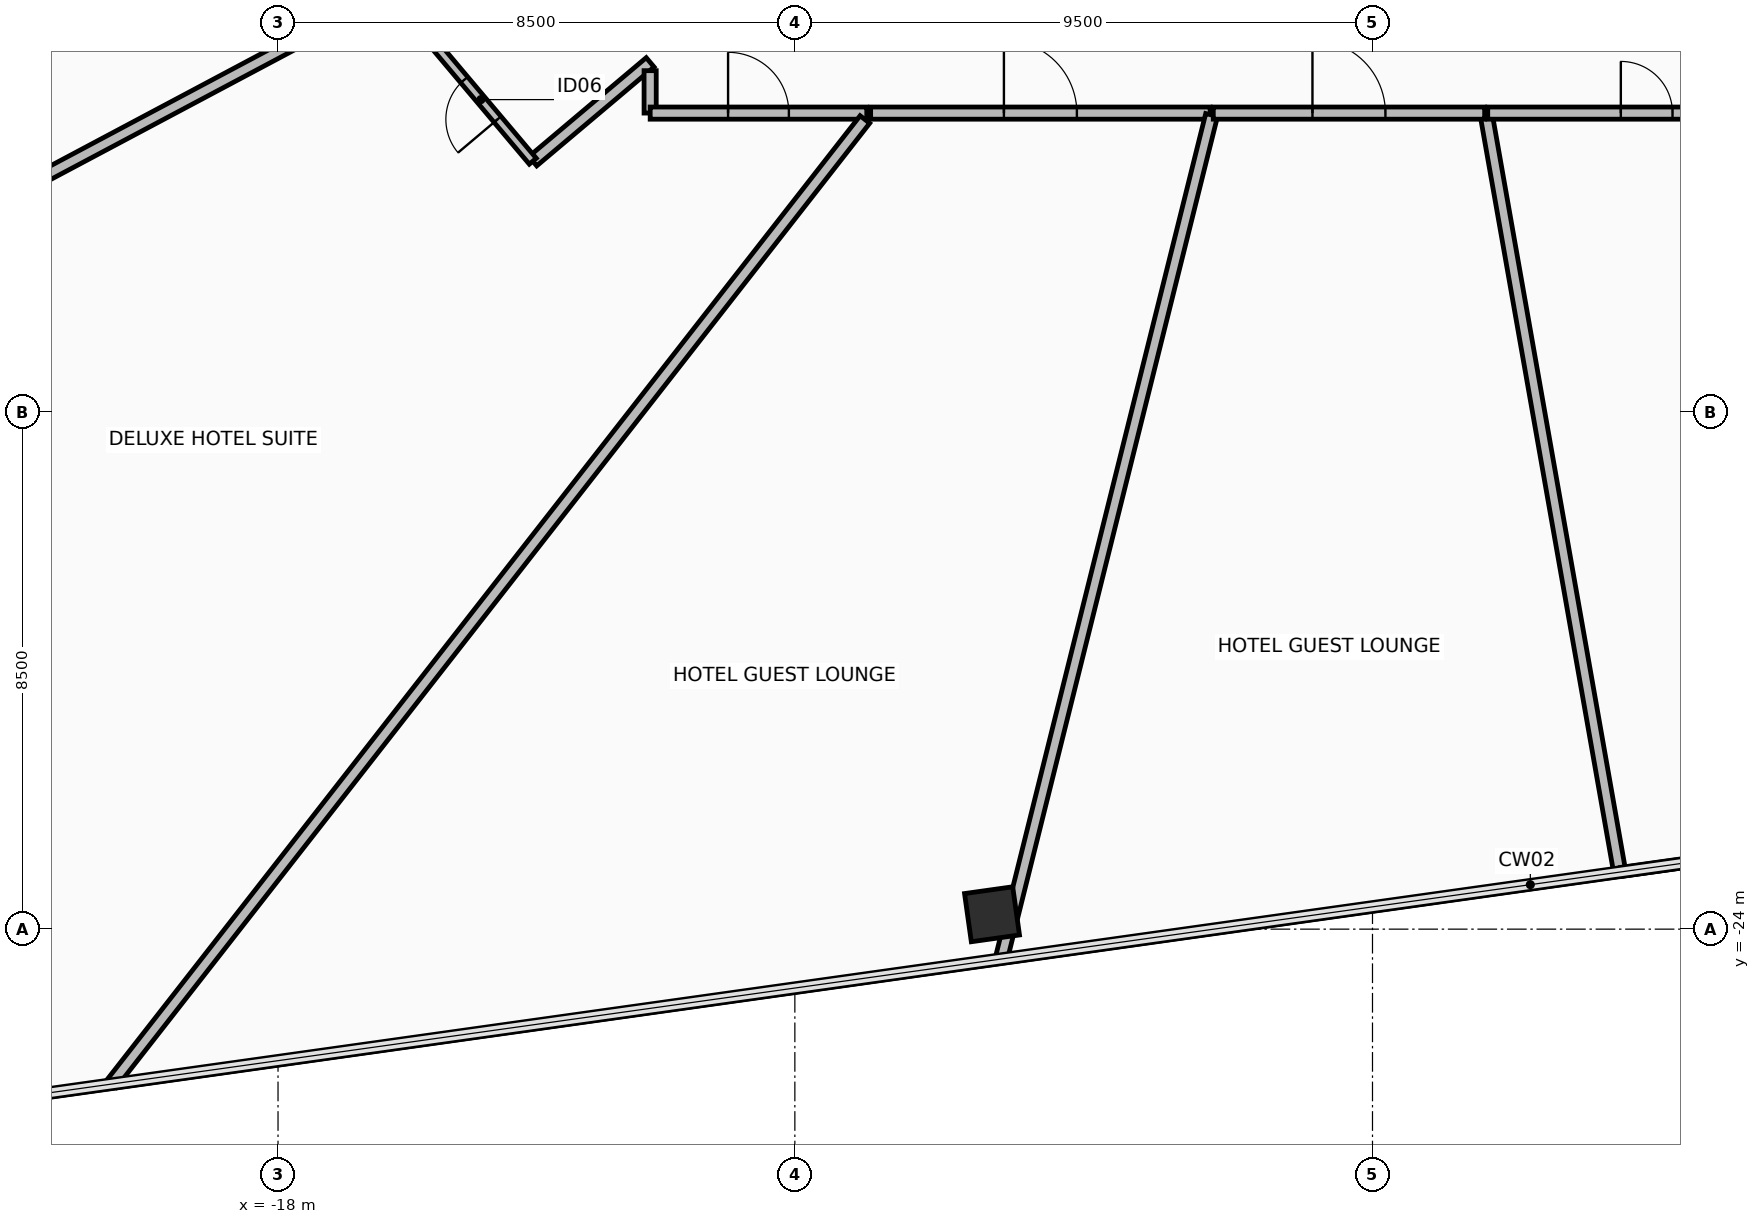
"""IFC4 building model, lengths in metres.
Left out: names, types, materials, properties, quantities, classifications, styles, units other than length and angle.
Written with IfcOpenShell. Run it as: python <this file> out.ifc"""

import sys

from ifc_helpers import new_model, si_unit, direction, frame, frame_2d, origin, origin_2d, place, context, subcontext, project, spatial, rectangle, hollow_rectangle, extrude, element, fill, save


model = new_model("IFC4")
c1 = context("Model", 3, precision=1e-05, world=origin(), true_north=direction((0.0, 1.0)))
c2 = subcontext(c1, "Body", "Model", "MODEL_VIEW")
j1 = project(units=[si_unit("LENGTHUNIT", "METRE"), si_unit("PLANEANGLEUNIT", "RADIAN")], contexts=[c1])
p1 = place(None, origin())
s1 = spatial("IfcSite", under=j1, at=p1, CompositionType="ELEMENT")
p2 = place(p1, origin())
s2 = spatial("IfcBuilding", under=s1, at=p2, CompositionType="ELEMENT")
p3 = place(p2, frame((0.0, 0.0, 57.0)))
s3 = spatial("IfcBuildingStorey", under=s2, at=p3, CompositionType="ELEMENT", Elevation=57.0)
p4 = place(p3, frame((-6.257, -23.755, -0.19), z_axis=(0.0, 0.0, 1.0), x_axis=(0.990268068742, 0.13917310096, 0.0)))
e1 = element("IfcColumn", 1, at=p4, inside=s3, PredefinedType="COLUMN", context=c2, shape_type="SweptSolid", body=[
    extrude(hollow_rectangle(XDim=0.8, YDim=0.8, WallThickness=0.045, at=origin_2d()), origin(), (0.0, 0.0, 1.0), 3.64),
])
p5 = place(p3, frame((-11.88, -9.745, 0.0), z_axis=(0.0, 0.0, 1.0), x_axis=(-0.764712982519, -0.644371053328, 0.0)))
e2 = element("IfcWall", 2, at=p5, inside=s3, PredefinedType="PARTITIONING", context=c2, shape_type="SweptSolid", body=[
    extrude(rectangle(XDim=2.524, YDim=0.2, at=frame_2d((1.262, 0.0))), origin(), (0.0, 0.0, 1.0), 3.275),
])
p6 = place(p3, frame((-13.81, -11.371, 0.0), z_axis=(0.0, 0.0, 1.0), x_axis=(-0.644478981733, 0.764622025647, 0.0)))
e3 = element("IfcWall", 3, at=p6, inside=s3, PredefinedType="PARTITIONING", context=c2, shape_type="SweptSolid", body=[
    extrude(rectangle(XDim=2.65, YDim=0.15, at=frame_2d((1.325, 0.0))), origin(), (0.0, 0.0, 1.0), 2.87),
])
p7 = place(p6, frame((0.9, 0.0, 0.0)))
e4 = element("IfcOpeningElement", 4, at=p7, cuts=e3, PredefinedType="OPENING", context=c2, shape_type="SweptSolid", body=[
    extrude(rectangle(XDim=0.85, YDim=2.1, at=frame_2d((0.425, 1.05))), frame((0.0, 0.085, 0.0), z_axis=(0.0, -1.0, 0.0), x_axis=(1.0, 0.0, 0.0)), (0.0, 0.0, 1.0), 0.17),
])
p8 = place(p3, frame((-11.893, -6.324, 0.0), z_axis=(0.0, 0.0, 1.0), x_axis=(-0.882946043117, -0.469474477416, 0.0)))
e5 = element("IfcWall", 5, at=p8, inside=s3, PredefinedType="PARTITIONING", context=c2, shape_type="SweptSolid", body=[
    extrude(rectangle(XDim=12.747, YDim=0.2, at=frame_2d((6.374, 0.0))), origin(), (0.0, 0.0, 1.0), 2.47),
])
p9 = place(p3, frame((-23.087, -12.156, 0.0), z_axis=(0.0, 0.0, 1.0), x_axis=(0.374605375648, 0.927184346576, 0.0)))
e6 = element("IfcWall", 6, at=p9, inside=s3, PredefinedType="PARTITIONING", context=c2, shape_type="SweptSolid", body=[
    extrude(rectangle(XDim=11.685, YDim=0.15, at=frame_2d((5.842, 0.0))), origin(), (0.0, 0.0, 1.0), 3.275),
])
p10 = place(p3, frame((4.062, -23.038, 0.0), z_axis=(0.0, 0.0, 1.0), x_axis=(-0.173658422676, 0.984805946486, 0.0)))
e7 = element("IfcWall", 7, at=p10, inside=s3, PredefinedType="PARTITIONING", context=c2, shape_type="SweptSolid", body=[
    extrude(rectangle(XDim=12.62, YDim=0.2, at=frame_2d((6.31, 0.0))), origin(), (0.0, 0.0, 1.0), 2.47),
])
p11 = place(p3, frame((1.895, -10.58, 0.0), z_axis=(0.0, 0.0, 1.0), x_axis=(1.0, 0.0, 0.0)))
e8 = element("IfcWall", 8, at=p11, inside=s3, PredefinedType="PARTITIONING", context=c2, shape_type="SweptSolid", body=[
    extrude(rectangle(XDim=5.228, YDim=0.2, at=frame_2d((2.614, 0.0))), origin(), (0.0, 0.0, 1.0), 3.275),
])
p12 = place(p11, frame((2.189, 0.0, 0.0)))
e9 = element("IfcOpeningElement", 9, at=p12, cuts=e8, PredefinedType="OPENING", context=c2, shape_type="SweptSolid", body=[
    extrude(rectangle(XDim=0.85, YDim=2.1, at=frame_2d((0.425, 1.05))), frame((0.0, 0.11, 0.0), z_axis=(0.0, -1.0, 0.0), x_axis=(1.0, 0.0, 0.0)), (0.0, 0.0, 1.0), 0.22),
])
p13 = place(p3, frame((14.445, -21.603, 0.0), z_axis=(0.0, 0.0, 1.0), x_axis=(-0.990270056923, -0.139158953581, 0.0)))
e10 = element("IfcWall", 10, at=p13, inside=s3, PredefinedType="PARTITIONING", context=c2, shape_type="SweptSolid", body=[
    extrude(rectangle(XDim=10.456, YDim=0.15, at=frame_2d((5.228, 0.0))), origin(), (0.0, 0.0, 1.0), 3.275),
])
p14 = place(p3, frame((-11.88, -9.882, 0.0), z_axis=(0.0, 0.0, 1.0), x_axis=(0.0, -1.0, 0.0)))
e11 = element("IfcWall", 11, at=p14, inside=s3, PredefinedType="PARTITIONING", context=c2, shape_type="SweptSolid", body=[
    extrude(rectangle(XDim=0.697, YDim=0.2, at=frame_2d((0.349, 0.0))), origin(), (0.0, 0.0, 1.0), 2.67),
])
p15 = place(p3, frame((-11.879, -10.58, 0.0), z_axis=(0.0, 0.0, 1.0), x_axis=(1.0, 0.0, 0.0)))
e12 = element("IfcWall", 12, at=p15, inside=s3, PredefinedType="PARTITIONING", context=c2, shape_type="SweptSolid", body=[
    extrude(rectangle(XDim=3.562, YDim=0.2, at=frame_2d((1.781, 0.0))), origin(), (0.0, 0.0, 1.0), 2.67),
])
p16 = place(p15, frame((1.281, 0.0, 0.0)))
e13 = element("IfcOpeningElement", 13, at=p16, cuts=e12, PredefinedType="OPENING", context=c2, shape_type="SweptSolid", body=[
    extrude(rectangle(XDim=1.0, YDim=2.15, at=frame_2d((0.5, 1.075))), frame((0.0, 0.11, 0.0), z_axis=(0.0, -1.0, 0.0), x_axis=(1.0, 0.0, 0.0)), (0.0, 0.0, 1.0), 0.22),
])
p17 = place(p3, frame((-8.348, -10.685, 0.0), z_axis=(0.0, 0.0, 1.0), x_axis=(-0.615661230884, -0.788010944585, 0.0)))
e14 = element("IfcWall", 14, at=p17, inside=s3, PredefinedType="PARTITIONING", context=c2, shape_type="SweptSolid", body=[
    extrude(rectangle(XDim=20.121, YDim=0.2, at=frame_2d((10.06, 0.0))), origin(), (0.0, 0.0, 1.0), 2.47),
])
p18 = place(p3, frame((-8.254, -10.58, 0.0), z_axis=(0.0, 0.0, 1.0), x_axis=(1.0, 0.0, 0.0)))
e15 = element("IfcWall", 15, at=p18, inside=s3, PredefinedType="PARTITIONING", context=c2, shape_type="SweptSolid", body=[
    extrude(rectangle(XDim=5.584, YDim=0.2, at=frame_2d((2.792, 0.0))), origin(), (0.0, 0.0, 1.0), 2.67),
])
p19 = place(p18, frame((2.192, 0.0, 0.0)))
e16 = element("IfcOpeningElement", 16, at=p19, cuts=e15, PredefinedType="OPENING", context=c2, shape_type="SweptSolid", body=[
    extrude(rectangle(XDim=1.2, YDim=2.15, at=frame_2d((0.6, 1.075))), frame((0.0, 0.11, 0.0), z_axis=(0.0, -1.0, 0.0), x_axis=(1.0, 0.0, 0.0)), (0.0, 0.0, 1.0), 0.22),
])
p20 = place(p3, frame((-2.646, -10.611, 0.0), z_axis=(0.0, 0.0, 1.0), x_axis=(-0.241928502378, -0.970294078997, 0.0)))
e17 = element("IfcWall", 17, at=p20, inside=s3, PredefinedType="PARTITIONING", context=c2, shape_type="SweptSolid", body=[
    extrude(rectangle(XDim=14.289, YDim=0.2, at=frame_2d((7.144, 0.0))), origin(), (0.0, 0.0, 1.0), 2.47),
])
p21 = place(p3, frame((-2.618, -10.58, 0.0), z_axis=(0.0, 0.0, 1.0), x_axis=(1.0, 0.0, 0.0)))
e18 = element("IfcWall", 18, at=p21, inside=s3, PredefinedType="PARTITIONING", context=c2, shape_type="SweptSolid", body=[
    extrude(rectangle(XDim=4.463, YDim=0.2, at=frame_2d((2.231, 0.0))), origin(), (0.0, 0.0, 1.0), 3.275),
])
p22 = place(p21, frame((1.631, 0.0, 0.0)))
e19 = element("IfcOpeningElement", 19, at=p22, cuts=e18, PredefinedType="OPENING", context=c2, shape_type="SweptSolid", body=[
    extrude(rectangle(XDim=1.2, YDim=2.15, at=frame_2d((0.6, 1.075))), frame((0.0, 0.11, 0.0), z_axis=(0.0, -1.0, 0.0), x_axis=(1.0, 0.0, 0.0)), (0.0, 0.0, 1.0), 0.22),
])
p23 = place(p7, origin())
e20 = element("IfcDoor", 20, at=p23, inside=s3, OperationType="SINGLE_SWING_RIGHT", PredefinedType="DOOR", context=c2, shape_type="SweptSolid", body=[
    extrude(rectangle(XDim=0.85, YDim=2.1, at=frame_2d((0.425, 1.05))), frame((0.0, 0.025, 0.0), z_axis=(0.0, -1.0, 0.0), x_axis=(1.0, 0.0, 0.0)), (0.0, 0.0, 1.0), 0.05),
])
fill(e4, e20)
p24 = place(p12, origin())
e21 = element("IfcDoor", 21, at=p24, inside=s3, OperationType="SINGLE_SWING_RIGHT", PredefinedType="DOOR", context=c2, shape_type="SweptSolid", body=[
    extrude(rectangle(XDim=0.85, YDim=2.1, at=frame_2d((0.425, 1.05))), frame((0.0, 0.025, 0.0), z_axis=(0.0, -1.0, 0.0), x_axis=(1.0, 0.0, 0.0)), (0.0, 0.0, 1.0), 0.05),
])
fill(e9, e21)
p25 = place(p16, origin())
e22 = element("IfcDoor", 22, at=p25, inside=s3, OperationType="SINGLE_SWING_LEFT", PredefinedType="DOOR", context=c2, shape_type="SweptSolid", body=[
    extrude(rectangle(XDim=1.0, YDim=2.15, at=frame_2d((0.5, 1.075))), frame((0.0, 0.025, 0.0), z_axis=(0.0, -1.0, 0.0), x_axis=(1.0, 0.0, 0.0)), (0.0, 0.0, 1.0), 0.05),
])
fill(e13, e22)
p26 = place(p19, origin())
e23 = element("IfcDoor", 23, at=p26, inside=s3, OperationType="SINGLE_SWING_LEFT", PredefinedType="DOOR", context=c2, shape_type="SweptSolid", body=[
    extrude(rectangle(XDim=1.2, YDim=2.15, at=frame_2d((0.6, 1.075))), frame((0.0, 0.025, 0.0), z_axis=(0.0, -1.0, 0.0), x_axis=(1.0, 0.0, 0.0)), (0.0, 0.0, 1.0), 0.05),
])
fill(e16, e23)
p27 = place(p22, origin())
e24 = element("IfcDoor", 24, at=p27, inside=s3, OperationType="SINGLE_SWING_LEFT", PredefinedType="DOOR", context=c2, shape_type="SweptSolid", body=[
    extrude(rectangle(XDim=1.2, YDim=2.15, at=frame_2d((0.6, 1.075))), frame((0.0, 0.025, 0.0), z_axis=(0.0, -1.0, 0.0), x_axis=(1.0, 0.0, 0.0)), (0.0, 0.0, 1.0), 0.05),
])
fill(e19, e24)
save(model, sys.argv[1])
